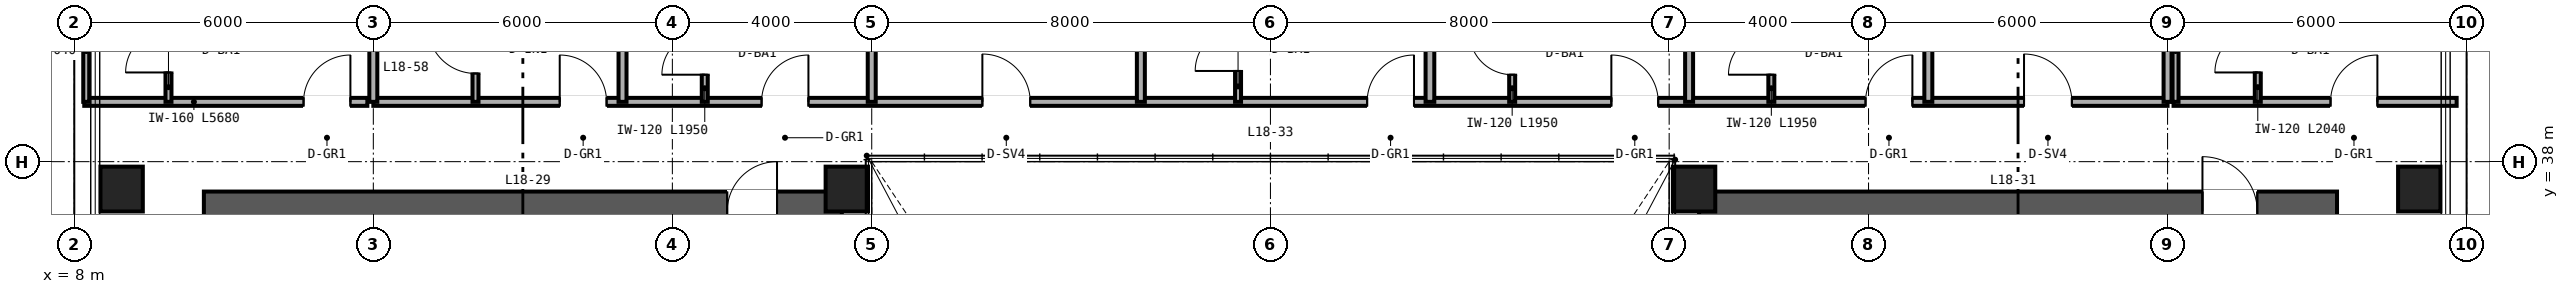
"""IFC4 building model, lengths in metres.
Left out: names, types, materials, properties, quantities, classifications, styles, units other than length and angle.
Written with IfcOpenShell. Run it as: python <this file> out.ifc"""

import sys

from ifc_helpers import new_model, si_unit, direction, frame, frame_2d, origin, origin_2d, place, context, subcontext, project, spatial, rectangle, hollow_rectangle, extrude, source, transform, mapped, element, fill, save


model = new_model("IFC4")
c1 = context("Model", 3, precision=1e-05, world=origin(), true_north=direction((0.0, 1.0)))
c2 = subcontext(c1, "Body", "Model", "MODEL_VIEW")
j1 = project(units=[si_unit("LENGTHUNIT", "METRE"), si_unit("PLANEANGLEUNIT", "RADIAN")], contexts=[c1])
p1 = place(None, origin())
s1 = spatial("IfcSite", under=j1, at=p1, CompositionType="ELEMENT")
p2 = place(p1, origin())
s2 = spatial("IfcBuilding", under=s1, at=p2, CompositionType="ELEMENT")
p3 = place(p2, frame((0.0, 0.0, 74.4)))
s3 = spatial("IfcBuildingStorey", under=s2, at=p3, CompositionType="ELEMENT", Elevation=74.4)
p4 = place(p3, frame((10.6, 37.0, 0.0), z_axis=(0.0, 0.0, 1.0), x_axis=(1.0, 0.0, 0.0)))
e1 = element("IfcWall", 1, at=p4, inside=s3, PredefinedType="SHEAR", context=c2, shape_type="SweptSolid", body=[
    extrude(rectangle(XDim=12.8, YDim=0.8, at=frame_2d((6.4, 0.0))), origin(), (0.0, 0.0, 1.0), 3.35),
])
p5 = place(p4, frame((10.5, 0.0, 0.0)))
e2 = element("IfcOpeningElement", 2, at=p5, cuts=e1, PredefinedType="OPENING", context=c2, shape_type="SweptSolid", body=[
    extrude(rectangle(XDim=1.0, YDim=2.15, at=frame_2d((0.5, 1.075))), frame((0.0, 0.41, 0.0), z_axis=(0.0, -1.0, 0.0), x_axis=(1.0, 0.0, 0.0)), (0.0, 0.0, 1.0), 0.82),
])
p6 = place(p3, frame((40.6, 37.0, 0.0), z_axis=(0.0, 0.0, 1.0), x_axis=(1.0, 0.0, 0.0)))
e3 = element("IfcWall", 3, at=p6, inside=s3, PredefinedType="SHEAR", context=c2, shape_type="SweptSolid", body=[
    extrude(rectangle(XDim=12.8, YDim=0.8, at=frame_2d((6.4, 0.0))), origin(), (0.0, 0.0, 1.0), 3.35),
])
p7 = place(p6, frame((10.1, 0.0, 0.0)))
e4 = element("IfcOpeningElement", 4, at=p7, cuts=e3, PredefinedType="OPENING", context=c2, shape_type="SweptSolid", body=[
    extrude(rectangle(XDim=1.1, YDim=2.15, at=frame_2d((0.55, 1.075))), frame((0.0, 0.41, 0.0), z_axis=(0.0, -1.0, 0.0), x_axis=(1.0, 0.0, 0.0)), (0.0, 0.0, 1.0), 0.82),
])
m1 = source(origin(), c2, "Body", "SweptSolid", [
    extrude(hollow_rectangle(XDim=0.85, YDim=0.9, WallThickness=0.04, at=origin_2d()), origin(), (0.0, 0.0, 1.0), 3.35),
])
for number, where, z_axis, x_axis in (
    (5, (8.95, 37.45, 0.0), (0.0, 0.0, 1.0), (1.0, 0.0, 0.0)),
    (6, (23.5, 37.45, 0.0), (0.0, 0.0, 1.0), (1.0, 0.0, 0.0)),
    (7, (40.5, 37.45, 0.0), (0.0, 0.0, 1.0), (1.0, 0.0, 0.0)),
    (8, (55.05, 37.45, 0.0), (0.0, 0.0, 1.0), (1.0, 0.0, 0.0)),
):
    element("IfcColumn", number, at=place(p3, frame(where, z_axis=z_axis, x_axis=x_axis)), inside=s3, PredefinedType="COLUMN", context=c2, shape_type="MappedRepresentation", body=[
        mapped(m1, transform((0.0, 0.0, 0.0), scale=1.0)),
    ])
p8 = place(p3, frame((8.2, 39.2, 0.0), z_axis=(0.0, 0.0, 1.0), x_axis=(1.0, 0.0, 0.0)))
e9 = element("IfcWall", 9, at=p8, inside=s3, PredefinedType="PARTITIONING", context=c2, shape_type="SweptSolid", body=[
    extrude(rectangle(XDim=5.68, YDim=0.16, at=frame_2d((2.84, 0.0))), origin(), (0.0, 0.0, 1.0), 3.35),
])
p9 = place(p8, frame((4.4, 0.0, 0.0)))
e10 = element("IfcOpeningElement", 10, at=p9, cuts=e9, PredefinedType="OPENING", context=c2, shape_type="SweptSolid", body=[
    extrude(rectangle(XDim=0.94, YDim=2.15, at=frame_2d((0.47, 1.075))), frame((0.0, 0.09, 0.0), z_axis=(0.0, -1.0, 0.0), x_axis=(1.0, 0.0, 0.0)), (0.0, 0.0, 1.0), 0.18),
])
p10 = place(p3, frame((9.89, 39.2, 0.0), z_axis=(0.0, 0.0, 1.0), x_axis=(0.0, 1.0, 0.0)))
e11 = element("IfcWall", 11, at=p10, inside=s3, PredefinedType="PARTITIONING", context=c2, shape_type="SweptSolid", body=[
    extrude(rectangle(XDim=2.04, YDim=0.12, at=frame_2d((1.02, 0.0))), origin(), (0.0, 0.0, 1.0), 3.35),
])
p11 = place(p10, frame((0.59, 0.0, 0.0)))
e12 = element("IfcOpeningElement", 12, at=p11, cuts=e11, PredefinedType="OPENING", context=c2, shape_type="SweptSolid", body=[
    extrude(rectangle(XDim=0.86, YDim=2.1, at=frame_2d((0.43, 1.05))), frame((0.0, 0.07, 0.0), z_axis=(0.0, -1.0, 0.0), x_axis=(1.0, 0.0, 0.0)), (0.0, 0.0, 1.0), 0.14),
])
p12 = place(p3, frame((8.24, 39.2, 0.0), z_axis=(0.0, 0.0, 1.0), x_axis=(0.0, 1.0, 0.0)))
e13 = element("IfcWall", 13, at=p12, inside=s3, PredefinedType="PARTITIONING", context=c2, shape_type="SweptSolid", body=[
    extrude(rectangle(XDim=2.04, YDim=0.12, at=frame_2d((1.02, 0.0))), origin(), (0.0, 0.0, 1.0), 3.35),
])
p13 = place(p3, frame((50.12, 39.2, 0.0), z_axis=(0.0, 0.0, 1.0), x_axis=(1.0, 0.0, 0.0)))
e14 = element("IfcWall", 14, at=p13, inside=s3, PredefinedType="PARTITIONING", context=c2, shape_type="SweptSolid", body=[
    extrude(rectangle(XDim=5.68, YDim=0.16, at=frame_2d((2.84, 0.0))), origin(), (0.0, 0.0, 1.0), 3.35),
])
p14 = place(p13, frame((3.15, 0.0, 0.0)))
e15 = element("IfcOpeningElement", 15, at=p14, cuts=e14, PredefinedType="OPENING", context=c2, shape_type="SweptSolid", body=[
    extrude(rectangle(XDim=0.94, YDim=2.15, at=frame_2d((0.47, 1.075))), frame((0.0, 0.09, 0.0), z_axis=(0.0, -1.0, 0.0), x_axis=(1.0, 0.0, 0.0)), (0.0, 0.0, 1.0), 0.18),
])
p15 = place(p3, frame((51.81, 39.2, 0.0), z_axis=(0.0, 0.0, 1.0), x_axis=(0.0, 1.0, 0.0)))
e16 = element("IfcWall", 16, at=p15, inside=s3, PredefinedType="PARTITIONING", context=c2, shape_type="SweptSolid", body=[
    extrude(rectangle(XDim=2.04, YDim=0.12, at=frame_2d((1.02, 0.0))), origin(), (0.0, 0.0, 1.0), 3.35),
])
p16 = place(p15, frame((0.59, 0.0, 0.0)))
e17 = element("IfcOpeningElement", 17, at=p16, cuts=e16, PredefinedType="OPENING", context=c2, shape_type="SweptSolid", body=[
    extrude(rectangle(XDim=0.86, YDim=2.1, at=frame_2d((0.43, 1.05))), frame((0.0, 0.07, 0.0), z_axis=(0.0, -1.0, 0.0), x_axis=(1.0, 0.0, 0.0)), (0.0, 0.0, 1.0), 0.14),
])
p17 = place(p3, frame((50.16, 39.2, 0.0), z_axis=(0.0, 0.0, 1.0), x_axis=(0.0, 1.0, 0.0)))
e18 = element("IfcWall", 18, at=p17, inside=s3, PredefinedType="PARTITIONING", context=c2, shape_type="SweptSolid", body=[
    extrude(rectangle(XDim=2.04, YDim=0.12, at=frame_2d((1.02, 0.0))), origin(), (0.0, 0.0, 1.0), 3.35),
])
p18 = place(p3, frame((14.0, 39.2, 0.0), z_axis=(0.0, 0.0, 1.0), x_axis=(1.0, 0.0, 0.0)))
e19 = element("IfcWall", 19, at=p18, inside=s3, PredefinedType="PARTITIONING", context=c2, shape_type="SweptSolid", body=[
    extrude(rectangle(XDim=36.0, YDim=0.16, at=frame_2d((18.0, 0.0))), origin(), (0.0, 0.0, 1.0), 2.571),
])
p19 = place(p18, frame((3.74, 0.0, 0.0)))
e20 = element("IfcOpeningElement", 20, at=p19, cuts=e19, PredefinedType="OPENING", context=c2, shape_type="SweptSolid", body=[
    extrude(rectangle(XDim=0.94, YDim=2.15, at=frame_2d((0.47, 1.075))), frame((0.0, 0.09, 0.0), z_axis=(0.0, -1.0, 0.0), x_axis=(1.0, 0.0, 0.0)), (0.0, 0.0, 1.0), 0.18),
])
p20 = place(p18, frame((7.79, 0.0, 0.0)))
e21 = element("IfcOpeningElement", 21, at=p20, cuts=e19, PredefinedType="OPENING", context=c2, shape_type="SweptSolid", body=[
    extrude(rectangle(XDim=0.94, YDim=2.15, at=frame_2d((0.47, 1.075))), frame((0.0, 0.09, 0.0), z_axis=(0.0, -1.0, 0.0), x_axis=(1.0, 0.0, 0.0)), (0.0, 0.0, 1.0), 0.18),
])
p21 = place(p18, frame((12.22, 0.0, 0.0)))
e22 = element("IfcOpeningElement", 22, at=p21, cuts=e19, PredefinedType="OPENING", context=c2, shape_type="SweptSolid", body=[
    extrude(rectangle(XDim=0.96, YDim=2.15, at=frame_2d((0.48, 1.075))), frame((0.0, 0.09, 0.0), z_axis=(0.0, -1.0, 0.0), x_axis=(1.0, 0.0, 0.0)), (0.0, 0.0, 1.0), 0.18),
])
p22 = place(p18, frame((19.94, 0.0, 0.0)))
e23 = element("IfcOpeningElement", 23, at=p22, cuts=e19, PredefinedType="OPENING", context=c2, shape_type="SweptSolid", body=[
    extrude(rectangle(XDim=0.94, YDim=2.15, at=frame_2d((0.47, 1.075))), frame((0.0, 0.09, 0.0), z_axis=(0.0, -1.0, 0.0), x_axis=(1.0, 0.0, 0.0)), (0.0, 0.0, 1.0), 0.18),
])
p23 = place(p18, frame((24.84, 0.0, 0.0)))
e24 = element("IfcOpeningElement", 24, at=p23, cuts=e19, PredefinedType="OPENING", context=c2, shape_type="SweptSolid", body=[
    extrude(rectangle(XDim=0.94, YDim=2.15, at=frame_2d((0.47, 1.075))), frame((0.0, 0.09, 0.0), z_axis=(0.0, -1.0, 0.0), x_axis=(1.0, 0.0, 0.0)), (0.0, 0.0, 1.0), 0.18),
])
p24 = place(p18, frame((29.94, 0.0, 0.0)))
e25 = element("IfcOpeningElement", 25, at=p24, cuts=e19, PredefinedType="OPENING", context=c2, shape_type="SweptSolid", body=[
    extrude(rectangle(XDim=0.94, YDim=2.15, at=frame_2d((0.47, 1.075))), frame((0.0, 0.09, 0.0), z_axis=(0.0, -1.0, 0.0), x_axis=(1.0, 0.0, 0.0)), (0.0, 0.0, 1.0), 0.18),
])
p25 = place(p18, frame((33.12, 0.0, 0.0)))
e26 = element("IfcOpeningElement", 26, at=p25, cuts=e19, PredefinedType="OPENING", context=c2, shape_type="SweptSolid", body=[
    extrude(rectangle(XDim=0.96, YDim=2.15, at=frame_2d((0.48, 1.075))), frame((0.0, 0.09, 0.0), z_axis=(0.0, -1.0, 0.0), x_axis=(1.0, 0.0, 0.0)), (0.0, 0.0, 1.0), 0.18),
])
for number, where, z_axis, x_axis in (
    (27, (14.0, 39.2, 0.0), (0.0, 0.0, 1.0), (0.0, 1.0, 0.0)),
    (28, (50.0, 39.2, 0.0), (0.0, 0.0, 1.0), (0.0, 1.0, 0.0)),
    (29, (19.0, 39.2, 0.0), (0.0, 0.0, 1.0), (0.0, 1.0, 0.0)),
):
    element("IfcWall", number, at=place(p3, frame(where, z_axis=z_axis, x_axis=x_axis)), inside=s3, PredefinedType="PARTITIONING", context=c2, shape_type="SweptSolid", body=[
        extrude(rectangle(XDim=10.44, YDim=0.16, at=frame_2d((5.22, 0.0))), origin(), (0.0, 0.0, 1.0), 2.657),
    ])
p26 = place(p3, frame((16.05, 39.2, 0.0), z_axis=(0.0, 0.0, 1.0), x_axis=(0.0, 1.0, 0.0)))
e30 = element("IfcWall", 30, at=p26, inside=s3, PredefinedType="PARTITIONING", context=c2, shape_type="SweptSolid", body=[
    extrude(rectangle(XDim=2.1, YDim=0.12, at=frame_2d((1.05, 0.0))), origin(), (0.0, 0.0, 1.0), 3.35),
])
p27 = place(p26, frame((0.57, 0.0, 0.0)))
e31 = element("IfcOpeningElement", 31, at=p27, cuts=e30, PredefinedType="OPENING", context=c2, shape_type="SweptSolid", body=[
    extrude(rectangle(XDim=0.96, YDim=2.15, at=frame_2d((0.48, 1.075))), frame((0.0, 0.07, 0.0), z_axis=(0.0, -1.0, 0.0), x_axis=(1.0, 0.0, 0.0)), (0.0, 0.0, 1.0), 0.14),
])
p28 = place(p3, frame((24.0, 39.2, 0.0), z_axis=(0.0, 0.0, 1.0), x_axis=(0.0, 1.0, 0.0)))
e32 = element("IfcWall", 32, at=p28, inside=s3, PredefinedType="PARTITIONING", context=c2, shape_type="SweptSolid", body=[
    extrude(rectangle(XDim=10.44, YDim=0.16, at=frame_2d((5.22, 0.0))), origin(), (0.0, 0.0, 1.0), 2.423),
])
p29 = place(p3, frame((20.65, 39.2, 0.0), z_axis=(0.0, 0.0, 1.0), x_axis=(0.0, 1.0, 0.0)))
e33 = element("IfcWall", 33, at=p29, inside=s3, PredefinedType="PARTITIONING", context=c2, shape_type="SweptSolid", body=[
    extrude(rectangle(XDim=1.95, YDim=0.12, at=frame_2d((0.975, 0.0))), origin(), (0.0, 0.0, 1.0), 3.35),
])
p30 = place(p29, frame((0.545, 0.0, 0.0)))
e34 = element("IfcOpeningElement", 34, at=p30, cuts=e33, PredefinedType="OPENING", context=c2, shape_type="SweptSolid", body=[
    extrude(rectangle(XDim=0.86, YDim=2.1, at=frame_2d((0.43, 1.05))), frame((0.0, 0.07, 0.0), z_axis=(0.0, -1.0, 0.0), x_axis=(1.0, 0.0, 0.0)), (0.0, 0.0, 1.0), 0.14),
])
p31 = place(p3, frame((29.4, 39.2, 0.0), z_axis=(0.0, 0.0, 1.0), x_axis=(0.0, 1.0, 0.0)))
e35 = element("IfcWall", 35, at=p31, inside=s3, PredefinedType="PARTITIONING", context=c2, shape_type="SweptSolid", body=[
    extrude(rectangle(XDim=10.44, YDim=0.16, at=frame_2d((5.22, 0.0))), origin(), (0.0, 0.0, 1.0), 2.423),
])
p32 = place(p3, frame((35.2, 39.2, 0.0), z_axis=(0.0, 0.0, 1.0), x_axis=(0.0, 1.0, 0.0)))
e36 = element("IfcWall", 36, at=p32, inside=s3, PredefinedType="PARTITIONING", context=c2, shape_type="SweptSolid", body=[
    extrude(rectangle(XDim=10.44, YDim=0.175, at=frame_2d((5.22, 0.0))), origin(), (0.0, 0.0, 1.0), 2.423),
])
p33 = place(p3, frame((31.35, 39.2, 0.0), z_axis=(0.0, 0.0, 1.0), x_axis=(0.0, 1.0, 0.0)))
e37 = element("IfcWall", 37, at=p33, inside=s3, PredefinedType="PARTITIONING", context=c2, shape_type="SweptSolid", body=[
    extrude(rectangle(XDim=2.1, YDim=0.12, at=frame_2d((1.05, 0.0))), origin(), (0.0, 0.0, 1.0), 3.35),
])
p34 = place(p33, frame((0.62, 0.0, 0.0)))
e38 = element("IfcOpeningElement", 38, at=p34, cuts=e37, PredefinedType="OPENING", context=c2, shape_type="SweptSolid", body=[
    extrude(rectangle(XDim=0.86, YDim=2.1, at=frame_2d((0.43, 1.05))), frame((0.0, 0.07, 0.0), z_axis=(0.0, -1.0, 0.0), x_axis=(1.0, 0.0, 0.0)), (0.0, 0.0, 1.0), 0.14),
])
p35 = place(p3, frame((40.4, 39.2, 0.0), z_axis=(0.0, 0.0, 1.0), x_axis=(0.0, 1.0, 0.0)))
e39 = element("IfcWall", 39, at=p35, inside=s3, PredefinedType="PARTITIONING", context=c2, shape_type="SweptSolid", body=[
    extrude(rectangle(XDim=10.44, YDim=0.16, at=frame_2d((5.22, 0.0))), origin(), (0.0, 0.0, 1.0), 2.423),
])
p36 = place(p3, frame((36.85, 39.2, 0.0), z_axis=(0.0, 0.0, 1.0), x_axis=(0.0, 1.0, 0.0)))
e40 = element("IfcWall", 40, at=p36, inside=s3, PredefinedType="PARTITIONING", context=c2, shape_type="SweptSolid", body=[
    extrude(rectangle(XDim=1.95, YDim=0.12, at=frame_2d((0.975, 0.0))), origin(), (0.0, 0.0, 1.0), 3.35),
])
p37 = place(p36, frame((0.545, 0.0, 0.0)))
e41 = element("IfcOpeningElement", 41, at=p37, cuts=e40, PredefinedType="OPENING", context=c2, shape_type="SweptSolid", body=[
    extrude(rectangle(XDim=0.86, YDim=2.1, at=frame_2d((0.43, 1.05))), frame((0.0, 0.07, 0.0), z_axis=(0.0, -1.0, 0.0), x_axis=(1.0, 0.0, 0.0)), (0.0, 0.0, 1.0), 0.14),
])
p38 = place(p3, frame((45.2, 39.2, 0.0), z_axis=(0.0, 0.0, 1.0), x_axis=(0.0, 1.0, 0.0)))
e42 = element("IfcWall", 42, at=p38, inside=s3, PredefinedType="PARTITIONING", context=c2, shape_type="SweptSolid", body=[
    extrude(rectangle(XDim=10.44, YDim=0.16, at=frame_2d((5.22, 0.0))), origin(), (0.0, 0.0, 1.0), 2.657),
])
p39 = place(p3, frame((42.05, 39.2, 0.0), z_axis=(0.0, 0.0, 1.0), x_axis=(0.0, 1.0, 0.0)))
e43 = element("IfcWall", 43, at=p39, inside=s3, PredefinedType="PARTITIONING", context=c2, shape_type="SweptSolid", body=[
    extrude(rectangle(XDim=1.95, YDim=0.12, at=frame_2d((0.975, 0.0))), origin(), (0.0, 0.0, 1.0), 3.35),
])
p40 = place(p39, frame((0.545, 0.0, 0.0)))
e44 = element("IfcOpeningElement", 44, at=p40, cuts=e43, PredefinedType="OPENING", context=c2, shape_type="SweptSolid", body=[
    extrude(rectangle(XDim=0.86, YDim=2.1, at=frame_2d((0.43, 1.05))), frame((0.0, 0.07, 0.0), z_axis=(0.0, -1.0, 0.0), x_axis=(1.0, 0.0, 0.0)), (0.0, 0.0, 1.0), 0.14),
])
m2 = source(origin(), c2, "Body", "SweptSolid", [
    extrude(rectangle(XDim=1.0, YDim=2.15, at=frame_2d((0.5, 1.075))), frame((0.0, 0.025, 0.0), z_axis=(0.0, -1.0, 0.0), x_axis=(1.0, 0.0, 0.0)), (0.0, 0.0, 1.0), 0.05),
])
p41 = place(p5, origin())
e45 = element("IfcDoor", 45, at=p41, inside=s3, OperationType="SINGLE_SWING_RIGHT", PredefinedType="DOOR", context=c2, shape_type="MappedRepresentation", body=[
    mapped(m2, transform((0.0, 0.0, 0.0), scale=1.0)),
])
fill(e2, e45)
m3 = source(origin(), c2, "Body", "SweptSolid", [
    extrude(rectangle(XDim=1.1, YDim=2.15, at=frame_2d((0.55, 1.075))), frame((0.0, 0.025, 0.0), z_axis=(0.0, -1.0, 0.0), x_axis=(1.0, 0.0, 0.0)), (0.0, 0.0, 1.0), 0.05),
])
p42 = place(p7, origin())
e46 = element("IfcDoor", 46, at=p42, inside=s3, OperationType="SINGLE_SWING_LEFT", PredefinedType="DOOR", context=c2, shape_type="MappedRepresentation", body=[
    mapped(m3, transform((0.0, 0.0, 0.0), scale=1.0)),
])
fill(e4, e46)
m4 = source(origin(), c2, "Body", "SweptSolid", [
    extrude(rectangle(XDim=0.86, YDim=2.1, at=frame_2d((0.43, 1.05))), frame((0.0, 0.025, 0.0), z_axis=(0.0, -1.0, 0.0), x_axis=(1.0, 0.0, 0.0)), (0.0, 0.0, 1.0), 0.05),
])
p43 = place(p11, origin())
e47 = element("IfcDoor", 47, at=p43, inside=s3, OperationType="SINGLE_SWING_LEFT", PredefinedType="DOOR", context=c2, shape_type="MappedRepresentation", body=[
    mapped(m4, transform((0.0, 0.0, 0.0), scale=1.0)),
])
fill(e12, e47)
m5 = source(origin(), c2, "Body", "SweptSolid", [
    extrude(rectangle(XDim=0.94, YDim=2.15, at=frame_2d((0.47, 1.075))), frame((0.0, 0.025, 0.0), z_axis=(0.0, -1.0, 0.0), x_axis=(1.0, 0.0, 0.0)), (0.0, 0.0, 1.0), 0.05),
])
p44 = place(p9, origin())
e48 = element("IfcDoor", 48, at=p44, inside=s3, OperationType="SINGLE_SWING_RIGHT", PredefinedType="DOOR", context=c2, shape_type="MappedRepresentation", body=[
    mapped(m5, transform((0.0, 0.0, 0.0), scale=1.0)),
])
fill(e10, e48)
p45 = place(p16, origin())
e49 = element("IfcDoor", 49, at=p45, inside=s3, OperationType="SINGLE_SWING_LEFT", PredefinedType="DOOR", context=c2, shape_type="MappedRepresentation", body=[
    mapped(m4, transform((0.0, 0.0, 0.0), scale=1.0)),
])
fill(e17, e49)
p46 = place(p14, origin())
e50 = element("IfcDoor", 50, at=p46, inside=s3, OperationType="SINGLE_SWING_RIGHT", PredefinedType="DOOR", context=c2, shape_type="MappedRepresentation", body=[
    mapped(m5, transform((0.0, 0.0, 0.0), scale=1.0)),
])
fill(e15, e50)
m6 = source(origin(), c2, "Body", "SweptSolid", [
    extrude(rectangle(XDim=0.96, YDim=2.15, at=frame_2d((0.48, 1.075))), frame((0.0, 0.025, 0.0), z_axis=(0.0, -1.0, 0.0), x_axis=(1.0, 0.0, 0.0)), (0.0, 0.0, 1.0), 0.05),
])
p47 = place(p27, origin())
e51 = element("IfcDoor", 51, at=p47, inside=s3, OperationType="SINGLE_SWING_RIGHT", PredefinedType="DOOR", context=c2, shape_type="MappedRepresentation", body=[
    mapped(m6, transform((0.0, 0.0, 0.0), scale=1.0)),
])
fill(e31, e51)
p48 = place(p30, origin())
e52 = element("IfcDoor", 52, at=p48, inside=s3, OperationType="SINGLE_SWING_LEFT", PredefinedType="DOOR", context=c2, shape_type="MappedRepresentation", body=[
    mapped(m4, transform((0.0, 0.0, 0.0), scale=1.0)),
])
fill(e34, e52)
p49 = place(p34, origin())
e53 = element("IfcDoor", 53, at=p49, inside=s3, OperationType="SINGLE_SWING_LEFT", PredefinedType="DOOR", context=c2, shape_type="MappedRepresentation", body=[
    mapped(m4, transform((0.0, 0.0, 0.0), scale=1.0)),
])
fill(e38, e53)
p50 = place(p37, origin())
e54 = element("IfcDoor", 54, at=p50, inside=s3, OperationType="SINGLE_SWING_RIGHT", PredefinedType="DOOR", context=c2, shape_type="MappedRepresentation", body=[
    mapped(m4, transform((0.0, 0.0, 0.0), scale=1.0)),
])
fill(e41, e54)
p51 = place(p40, origin())
e55 = element("IfcDoor", 55, at=p51, inside=s3, OperationType="SINGLE_SWING_LEFT", PredefinedType="DOOR", context=c2, shape_type="MappedRepresentation", body=[
    mapped(m4, transform((0.0, 0.0, 0.0), scale=1.0)),
])
fill(e44, e55)
p52 = place(p19, origin())
e56 = element("IfcDoor", 56, at=p52, inside=s3, OperationType="SINGLE_SWING_LEFT", PredefinedType="DOOR", context=c2, shape_type="MappedRepresentation", body=[
    mapped(m5, transform((0.0, 0.0, 0.0), scale=1.0)),
])
fill(e20, e56)
p53 = place(p20, origin())
e57 = element("IfcDoor", 57, at=p53, inside=s3, OperationType="SINGLE_SWING_RIGHT", PredefinedType="DOOR", context=c2, shape_type="MappedRepresentation", body=[
    mapped(m5, transform((0.0, 0.0, 0.0), scale=1.0)),
])
fill(e21, e57)
p54 = place(p21, origin())
e58 = element("IfcDoor", 58, at=p54, inside=s3, OperationType="SINGLE_SWING_LEFT", PredefinedType="DOOR", context=c2, shape_type="MappedRepresentation", body=[
    mapped(m6, transform((0.0, 0.0, 0.0), scale=1.0)),
])
fill(e22, e58)
p55 = place(p22, origin())
e59 = element("IfcDoor", 59, at=p55, inside=s3, OperationType="SINGLE_SWING_RIGHT", PredefinedType="DOOR", context=c2, shape_type="MappedRepresentation", body=[
    mapped(m5, transform((0.0, 0.0, 0.0), scale=1.0)),
])
fill(e23, e59)
p56 = place(p23, origin())
e60 = element("IfcDoor", 60, at=p56, inside=s3, OperationType="SINGLE_SWING_LEFT", PredefinedType="DOOR", context=c2, shape_type="MappedRepresentation", body=[
    mapped(m5, transform((0.0, 0.0, 0.0), scale=1.0)),
])
fill(e24, e60)
p57 = place(p24, origin())
e61 = element("IfcDoor", 61, at=p57, inside=s3, OperationType="SINGLE_SWING_RIGHT", PredefinedType="DOOR", context=c2, shape_type="MappedRepresentation", body=[
    mapped(m5, transform((0.0, 0.0, 0.0), scale=1.0)),
])
fill(e25, e61)
p58 = place(p25, origin())
e62 = element("IfcDoor", 62, at=p58, inside=s3, OperationType="SINGLE_SWING_LEFT", PredefinedType="DOOR", context=c2, shape_type="MappedRepresentation", body=[
    mapped(m6, transform((0.0, 0.0, 0.0), scale=1.0)),
])
fill(e26, e62)
save(model, sys.argv[1])
